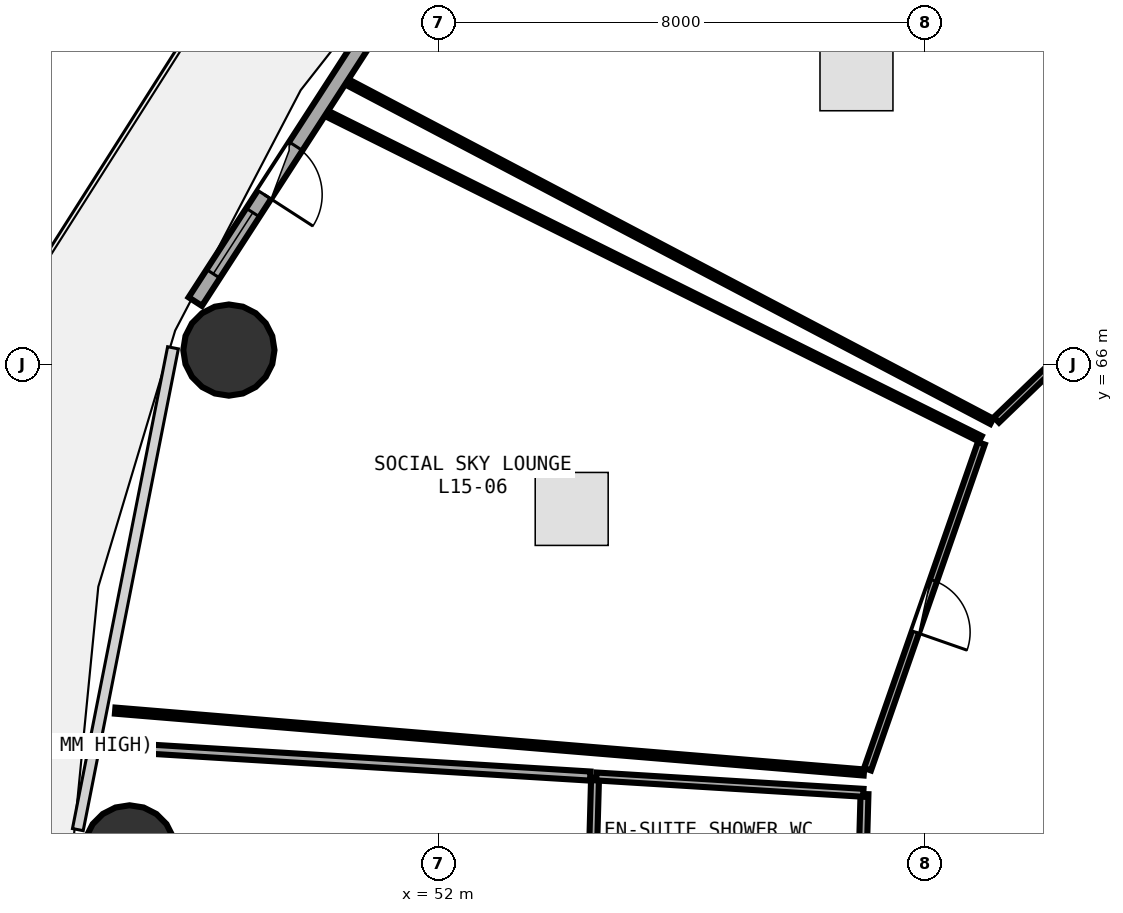
"""IFC4 building model, lengths in metres.
Left out: names, types, materials, properties, quantities, classifications, styles, units other than length and angle.
Written with IfcOpenShell. Run it as: python <this file> out.ifc"""

import sys

from ifc_helpers import new_model, si_unit, direction, frame, frame_2d, origin, origin_2d, place, context, subcontext, project, spatial, rectangle, circle, extrude, element, fill, save


model = new_model("IFC4")
c1 = context("Model", 3, precision=1e-05, world=origin(), true_north=direction((0.0, 1.0)))
c2 = subcontext(c1, "Body", "Model", "MODEL_VIEW")
j1 = project(units=[si_unit("LENGTHUNIT", "METRE"), si_unit("PLANEANGLEUNIT", "RADIAN")], contexts=[c1])
p1 = place(None, origin())
s1 = spatial("IfcSite", under=j1, at=p1, CompositionType="ELEMENT")
p2 = place(p1, origin())
s2 = spatial("IfcBuilding", under=s1, at=p2, CompositionType="ELEMENT")
p3 = place(p2, frame((0.0, 0.0, 60.0)))
s3 = spatial("IfcBuildingStorey", under=s2, at=p3, CompositionType="ELEMENT", Elevation=60.0)
for number, where, z_axis, x_axis in (
    (1, (48.553, 66.236, 0.0), (0.0, 0.0, 1.0), (1.0, 0.0, 0.0)),
    (2, (46.92, 58.0, 0.0), (0.0, 0.0, 1.0), (1.0, 0.0, 0.0)),
):
    element("IfcColumn", number, at=place(p3, frame(where, z_axis=z_axis, x_axis=x_axis)), inside=s3, PredefinedType="COLUMN", context=c2, shape_type="SweptSolid", body=[
        extrude(circle(Radius=0.75, at=origin_2d()), origin(), (0.0, 0.0, 1.0), 3.75),
    ])
p4 = place(p3, frame((52.311, 73.698, 0.0), z_axis=(0.0, 0.0, 1.0), x_axis=(-0.543005114258, -0.839729388488, 0.0)))
e3 = element("IfcWall", 3, at=p4, inside=s3, PredefinedType="SOLIDWALL", context=c2, shape_type="SweptSolid", body=[
    extrude(rectangle(XDim=7.938, YDim=0.26, at=frame_2d((3.969, 0.0))), origin(), (0.0, 0.0, 1.0), 3.475),
])
p5 = place(p4, frame((4.894, 0.0, 0.0)))
e4 = element("IfcOpeningElement", 4, at=p5, cuts=e3, PredefinedType="OPENING", context=c2, shape_type="SweptSolid", body=[
    extrude(rectangle(XDim=0.95, YDim=2.1, at=frame_2d((0.475, 1.05))), frame((0.0, 0.14, 0.0), z_axis=(0.0, -1.0, 0.0), x_axis=(1.0, 0.0, 0.0)), (0.0, 0.0, 1.0), 0.28),
])
p6 = place(p4, frame((6.194, 0.0, 0.85)))
e5 = element("IfcOpeningElement", 5, at=p6, cuts=e3, PredefinedType="OPENING", context=c2, shape_type="SweptSolid", body=[
    extrude(rectangle(XDim=1.2, YDim=1.45, at=frame_2d((0.6, 0.725))), frame((0.0, 0.14, 0.0), z_axis=(0.0, -1.0, 0.0), x_axis=(1.0, 0.0, 0.0)), (0.0, 0.0, 1.0), 0.28),
])
p7 = place(p3, frame((65.432, 69.183, 0.0), z_axis=(0.0, 0.0, 1.0), x_axis=(-0.720434955678, -0.69352251199, 0.0)))
e6 = element("IfcWall", 6, at=p7, inside=s3, PredefinedType="PARTITIONING", context=c2, shape_type="SweptSolid", body=[
    extrude(rectangle(XDim=5.906, YDim=0.12, at=frame_2d((2.953, 0.0))), origin(), (0.0, 0.0, 1.0), 2.875),
])
p8 = place(p7, frame((2.503, 0.0, 0.0)))
e7 = element("IfcOpeningElement", 7, at=p8, cuts=e6, PredefinedType="OPENING", context=c2, shape_type="SweptSolid", body=[
    extrude(rectangle(XDim=0.9, YDim=2.08, at=frame_2d((0.45, 1.04))), frame((0.0, 0.07, 0.0), z_axis=(0.0, -1.0, 0.0), x_axis=(1.0, 0.0, 0.0)), (0.0, 0.0, 1.0), 0.14),
])
p9 = place(p3, frame((60.928, 64.702, 0.0), z_axis=(0.0, 0.0, 1.0), x_axis=(-0.329626249966, -0.944111505773, 0.0)))
e8 = element("IfcWall", 8, at=p9, inside=s3, PredefinedType="PARTITIONING", context=c2, shape_type="SweptSolid", body=[
    extrude(rectangle(XDim=5.677, YDim=0.12, at=frame_2d((2.839, 0.0))), origin(), (0.0, 0.0, 1.0), 3.48),
])
p10 = place(p9, frame((2.389, 0.0, 0.0)))
e9 = element("IfcOpeningElement", 9, at=p10, cuts=e8, PredefinedType="OPENING", context=c2, shape_type="SweptSolid", body=[
    extrude(rectangle(XDim=0.9, YDim=2.08, at=frame_2d((0.45, 1.04))), frame((0.0, 0.07, 0.0), z_axis=(0.0, -1.0, 0.0), x_axis=(1.0, 0.0, 0.0)), (0.0, 0.0, 1.0), 0.14),
])
p11 = place(p3, frame((65.756, 69.443, 0.0), z_axis=(0.0, 0.0, 1.0), x_axis=(-0.599892569248, 0.800080561794, 0.0)))
e10 = element("IfcWall", 10, at=p11, inside=s3, PredefinedType="PARTITIONING", context=c2, shape_type="SweptSolid", body=[
    extrude(rectangle(XDim=11.272, YDim=0.15, at=frame_2d((5.636, 0.0))), origin(), (0.0, 0.0, 1.0), 2.875),
])
p12 = place(p3, frame((61.099, 65.065, 0.0), z_axis=(0.0, 0.0, 1.0), x_axis=(-0.884914680824, 0.46575316173, 0.0)))
e11 = element("IfcWall", 11, at=p12, inside=s3, PredefinedType="PARTITIONING", context=c2, shape_type="SweptSolid", body=[
    extrude(rectangle(XDim=11.963, YDim=0.1, at=frame_2d((5.981, 0.0))), origin(), (0.0, 0.0, 1.0), 2.875),
])
p13 = place(p3, frame((58.438, 78.13, 0.0), z_axis=(0.0, 0.0, 1.0), x_axis=(0.620037561985, -0.78457212653, 0.0)))
e12 = element("IfcWall", 12, at=p13, inside=s3, PredefinedType="PARTITIONING", context=c2, shape_type="SweptSolid", body=[
    extrude(rectangle(XDim=11.31, YDim=0.1, at=frame_2d((5.655, 0.0))), origin(), (0.0, 0.0, 1.0), 2.875),
])
p14 = place(p3, frame((58.997, 59.289, 0.0), z_axis=(0.0, 0.0, 1.0), x_axis=(-0.996604780232, 0.08233414856, 0.0)))
e13 = element("IfcWall", 13, at=p14, inside=s3, PredefinedType="PARTITIONING", context=c2, shape_type="SweptSolid", body=[
    extrude(rectangle(XDim=12.356, YDim=0.1, at=frame_2d((6.178, 0.0))), origin(), (0.0, 0.0, 1.0), 2.875),
])
p15 = place(p3, frame((50.173, 70.121, 0.0), z_axis=(0.0, 0.0, 1.0), x_axis=(0.895272258208, -0.445519453764, 0.0)))
e14 = element("IfcWall", 14, at=p15, inside=s3, PredefinedType="PARTITIONING", context=c2, shape_type="SweptSolid", body=[
    extrude(rectangle(XDim=11.996, YDim=0.1, at=frame_2d((5.998, 0.0))), origin(), (0.0, 0.0, 1.0), 2.875),
])
p16 = place(p3, frame((59.007, 58.934, 0.0), z_axis=(0.0, 0.0, 1.0), x_axis=(-0.027750076623, -0.99961489247, 0.0)))
e15 = element("IfcWall", 15, at=p16, inside=s3, PredefinedType="PLUMBINGWALL", context=c2, shape_type="SweptSolid", body=[
    extrude(rectangle(XDim=1.197, YDim=0.13, at=frame_2d((0.598, 0.0))), origin(), (0.0, 0.0, 1.0), 2.875),
])
p17 = place(p3, frame((54.533, 57.658, 0.0), z_axis=(0.0, 0.0, 1.0), x_axis=(0.02760506688, 0.999618907526, 0.0)))
e16 = element("IfcWall", 16, at=p17, inside=s3, PredefinedType="PLUMBINGWALL", context=c2, shape_type="SweptSolid", body=[
    extrude(rectangle(XDim=1.548, YDim=0.13, at=frame_2d((0.774, 0.0))), origin(), (0.0, 0.0, 1.0), 2.875),
])
p18 = place(p3, frame((54.596, 59.224, 0.0), z_axis=(0.0, 0.0, 1.0), x_axis=(0.998131655241, -0.061099908397, 0.0)))
e17 = element("IfcWall", 17, at=p18, inside=s3, PredefinedType="PLUMBINGWALL", context=c2, shape_type="SweptSolid", body=[
    extrude(rectangle(XDim=4.399, YDim=0.13, at=frame_2d((2.2, 0.0))), origin(), (0.0, 0.0, 1.0), 3.175),
])
p19 = place(p3, frame((46.627, 59.712, 0.0), z_axis=(0.0, 0.0, 1.0), x_axis=(0.998135541011, -0.0610363971, 0.0)))
e18 = element("IfcWall", 18, at=p19, inside=s3, PredefinedType="PARTITIONING", context=c2, shape_type="SweptSolid", body=[
    extrude(rectangle(XDim=7.884, YDim=0.15, at=frame_2d((3.942, 0.0))), origin(), (0.0, 0.0, 1.0), 2.875),
])
p20 = place(p5, frame((0.95, 0.0, 0.0), z_axis=(0.0, 0.0, 1.0), x_axis=(-1.0, 0.0, 0.0)))
e19 = element("IfcDoor", 19, at=p20, inside=s3, OperationType="SINGLE_SWING_LEFT", PredefinedType="DOOR", context=c2, shape_type="SweptSolid", body=[
    extrude(rectangle(XDim=0.95, YDim=2.1, at=frame_2d((0.475, 1.05))), frame((0.0, 0.025, 0.0), z_axis=(0.0, -1.0, 0.0), x_axis=(1.0, 0.0, 0.0)), (0.0, 0.0, 1.0), 0.05),
])
fill(e4, e19)
p21 = place(p6, origin())
e20 = element("IfcWindow", 20, at=p21, inside=s3, PartitioningType="SINGLE_PANEL", PredefinedType="WINDOW", context=c2, shape_type="SweptSolid", body=[
    extrude(rectangle(XDim=1.2, YDim=1.45, at=frame_2d((0.6, 0.725))), frame((0.0, 0.03, 0.0), z_axis=(0.0, -1.0, 0.0), x_axis=(1.0, 0.0, 0.0)), (0.0, 0.0, 1.0), 0.06),
])
fill(e5, e20)
p22 = place(p10, origin())
e21 = element("IfcDoor", 21, at=p22, inside=s3, OperationType="SINGLE_SWING_RIGHT", PredefinedType="DOOR", context=c2, shape_type="SweptSolid", body=[
    extrude(rectangle(XDim=0.9, YDim=2.08, at=frame_2d((0.45, 1.04))), frame((0.0, 0.025, 0.0), z_axis=(0.0, -1.0, 0.0), x_axis=(1.0, 0.0, 0.0)), (0.0, 0.0, 1.0), 0.05),
])
fill(e9, e21)
save(model, sys.argv[1])
